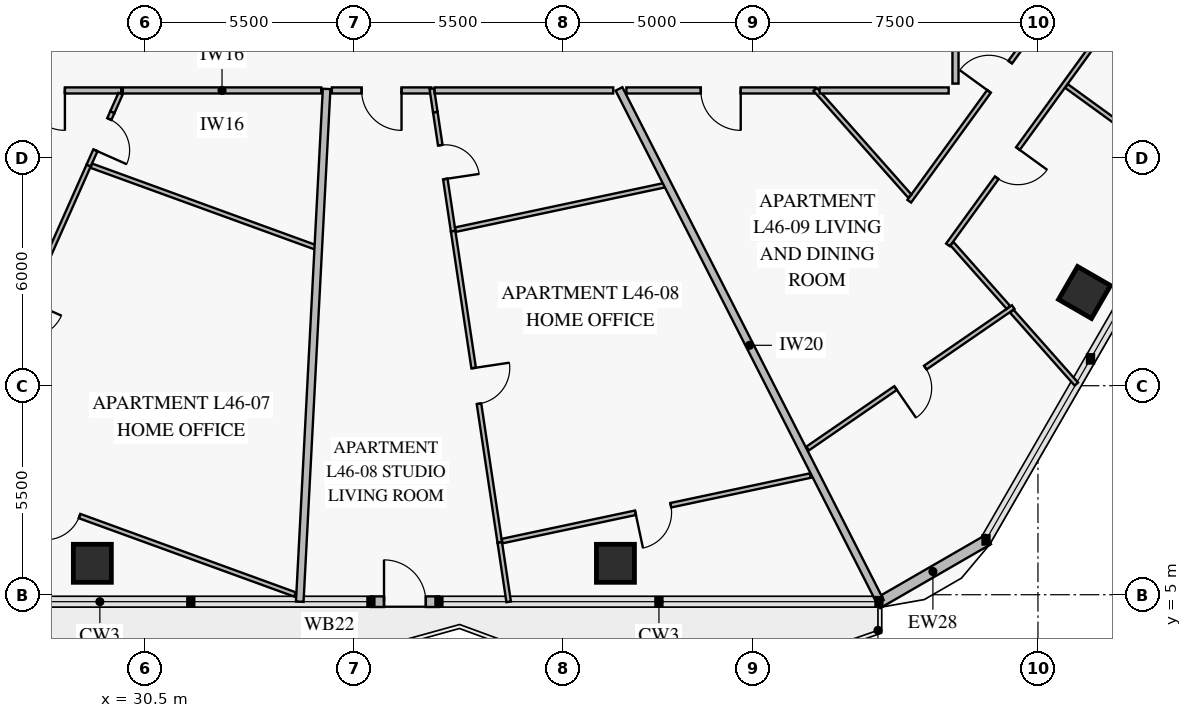
"""IFC4 building model, lengths in metres.
Left out: names, types, materials, properties, quantities, classifications, styles, units other than length and angle.
Written with IfcOpenShell. Run it as: python <this file> out.ifc"""

import sys

from ifc_helpers import new_model, si_unit, direction, frame, frame_2d, origin, origin_2d, place, context, subcontext, project, spatial, rectangle, extrude, element, fill, save


model = new_model("IFC4")
c1 = context("Model", 3, precision=1e-05, world=origin(), true_north=direction((0.0, 1.0)))
c2 = subcontext(c1, "Body", "Model", "MODEL_VIEW")
j1 = project(units=[si_unit("LENGTHUNIT", "METRE"), si_unit("PLANEANGLEUNIT", "RADIAN")], contexts=[c1])
p1 = place(None, origin())
s1 = spatial("IfcSite", under=j1, at=p1, CompositionType="ELEMENT")
p2 = place(p1, origin())
s2 = spatial("IfcBuilding", under=s1, at=p2, CompositionType="ELEMENT")
p3 = place(p2, frame((0.0, 0.0, 184.6)))
s3 = spatial("IfcBuildingStorey", under=s2, at=p3, CompositionType="ELEMENT", Elevation=184.6)
for number, where, z_axis, x_axis in (
    (1, (29.118, 5.827, 0.0), (0.0, 0.0, 1.0), (1.0, 0.0, 0.0)),
    (2, (42.882, 5.827, 0.0), (0.0, 0.0, 1.0), (1.0, 0.0, 0.0)),
    (3, (55.226, 12.953, 0.0), (0.0, 0.0, 1.0), (0.5, 0.866, 0.0)),
):
    element("IfcColumn", number, at=place(p3, frame(where, z_axis=z_axis, x_axis=x_axis)), inside=s3, PredefinedType="COLUMN", context=c2, shape_type="SweptSolid", body=[
        extrude(rectangle(XDim=1.0, YDim=1.0, at=origin_2d()), origin(), (0.0, 0.0, 1.0), 3.55),
    ])
p4 = place(p3, frame((52.693, 6.452, 0.0), z_axis=(0.0, 0.0, 1.0), x_axis=(-0.866020068361, -0.500009241111, 0.0)))
e4 = element("IfcWall", 4, at=p4, inside=s3, PredefinedType="SOLIDWALL", context=c2, shape_type="SweptSolid", body=[
    extrude(rectangle(XDim=3.365, YDim=0.28, at=frame_2d((1.683, 0.0))), origin(), (0.0, 0.0, 1.0), 3.55),
])
p5 = place(p3, frame((38.238, 4.817, 0.0), z_axis=(0.0, 0.0, 1.0), x_axis=(-1.0, 0.0, 0.0)))
e5 = element("IfcWall", 5, at=p5, inside=s3, PredefinedType="SOLIDWALL", context=c2, shape_type="SweptSolid", body=[
    extrude(rectangle(XDim=1.79, YDim=0.28, at=frame_2d((0.895, 0.0))), origin(), (0.0, 0.0, 1.0), 3.55),
])
p6 = place(p5, frame((0.345, 0.0, 0.0)))
e6 = element("IfcOpeningElement", 6, at=p6, cuts=e5, PredefinedType="OPENING", context=c2, shape_type="SweptSolid", body=[
    extrude(rectangle(XDim=1.1, YDim=2.2, at=frame_2d((0.55, 1.1))), frame((0.0, 0.152, 0.0), z_axis=(0.0, -1.0, 0.0), x_axis=(1.0, 0.0, 0.0)), (0.0, 0.0, 1.0), 0.304),
])
p7 = place(p3, frame((29.645, 17.7, 0.0), z_axis=(0.0, 0.0, 1.0), x_axis=(-0.406138466053, -0.91381154862, 0.0)))
e7 = element("IfcWall", 7, at=p7, inside=s3, PredefinedType="PARTITIONING", context=c2, shape_type="SweptSolid", body=[
    extrude(rectangle(XDim=1.544, YDim=0.12, at=frame_2d((0.772, 0.0))), origin(), (0.0, 0.0, 1.0), 3.55),
])
p8 = place(p7, frame((0.2, 0.0, 0.0)))
e8 = element("IfcOpeningElement", 8, at=p8, cuts=e7, PredefinedType="OPENING", context=c2, shape_type="SweptSolid", body=[
    extrude(rectangle(XDim=0.9, YDim=2.1, at=frame_2d((0.45, 1.05))), frame((0.0, 0.072, 0.0), z_axis=(0.0, -1.0, 0.0), x_axis=(1.0, 0.0, 0.0)), (0.0, 0.0, 1.0), 0.144),
])
p9 = place(p3, frame((29.018, 16.289, 0.0), z_axis=(0.0, 0.0, 1.0), x_axis=(-0.406112696121, -0.913823001489, 0.0)))
e9 = element("IfcWall", 9, at=p9, inside=s3, PredefinedType="PARTITIONING", context=c2, shape_type="SweptSolid", body=[
    extrude(rectangle(XDim=8.79, YDim=0.12, at=frame_2d((4.395, 0.0))), origin(), (0.0, 0.0, 1.0), 3.55),
])
p10 = place(p9, frame((3.895, 0.0, 0.0)))
e10 = element("IfcOpeningElement", 10, at=p10, cuts=e9, PredefinedType="OPENING", context=c2, shape_type="SweptSolid", body=[
    extrude(rectangle(XDim=0.95, YDim=2.1, at=frame_2d((0.475, 1.05))), frame((0.0, 0.072, 0.0), z_axis=(0.0, -1.0, 0.0), x_axis=(1.0, 0.0, 0.0)), (0.0, 0.0, 1.0), 0.144),
])
p11 = place(p3, frame((25.523, 8.256, 0.0), z_axis=(0.0, 0.0, 1.0), x_axis=(0.939699589425, -0.34200099654, 0.0)))
e11 = element("IfcWall", 11, at=p11, inside=s3, PredefinedType="PARTITIONING", context=c2, shape_type="SweptSolid", body=[
    extrude(rectangle(XDim=9.499, YDim=0.12, at=frame_2d((4.75, 0.0))), origin(), (0.0, 0.0, 1.0), 2.87),
])
p12 = place(p11, frame((2.517, 0.0, 0.0)))
e12 = element("IfcOpeningElement", 12, at=p12, cuts=e11, PredefinedType="OPENING", context=c2, shape_type="SweptSolid", body=[
    extrude(rectangle(XDim=0.95, YDim=2.1, at=frame_2d((0.475, 1.05))), frame((0.0, 0.072, 0.0), z_axis=(0.0, -1.0, 0.0), x_axis=(1.0, 0.0, 0.0)), (0.0, 0.0, 1.0), 0.144),
])
p13 = place(p3, frame((25.865, 18.27, 0.0), z_axis=(0.0, 0.0, 1.0), x_axis=(1.0, 0.0, 0.0)))
e13 = element("IfcWall", 13, at=p13, inside=s3, PredefinedType="PARTITIONING", context=c2, shape_type="SweptSolid", body=[
    extrude(rectangle(XDim=4.011, YDim=0.16, at=frame_2d((2.006, 0.0))), origin(), (0.0, 0.0, 1.0), 3.55),
])
p14 = place(p13, frame((1.481, 0.0, 0.0)))
e14 = element("IfcOpeningElement", 14, at=p14, cuts=e13, PredefinedType="OPENING", context=c2, shape_type="SweptSolid", body=[
    extrude(rectangle(XDim=1.05, YDim=2.15, at=frame_2d((0.525, 1.075))), frame((0.0, 0.092, 0.0), z_axis=(0.0, -1.0, 0.0), x_axis=(1.0, 0.0, 0.0)), (0.0, 0.0, 1.0), 0.184),
])
p15 = place(p3, frame((38.142, 17.7, 0.0), z_axis=(0.0, 0.0, 1.0), x_axis=(0.148099173733, -0.988972514653, 0.0)))
e15 = element("IfcWall", 15, at=p15, inside=s3, PredefinedType="PARTITIONING", context=c2, shape_type="SweptSolid", body=[
    extrude(rectangle(XDim=3.167, YDim=0.12, at=frame_2d((1.583, 0.0))), origin(), (0.0, 0.0, 1.0), 3.55),
])
p16 = place(p15, frame((0.88, 0.0, 0.0)))
e16 = element("IfcOpeningElement", 16, at=p16, cuts=e15, PredefinedType="OPENING", context=c2, shape_type="SweptSolid", body=[
    extrude(rectangle(XDim=0.9, YDim=2.1, at=frame_2d((0.45, 1.05))), frame((0.0, 0.072, 0.0), z_axis=(0.0, -1.0, 0.0), x_axis=(1.0, 0.0, 0.0)), (0.0, 0.0, 1.0), 0.144),
])
p17 = place(p3, frame((38.611, 14.568, 0.0), z_axis=(0.0, 0.0, 1.0), x_axis=(0.148161808742, -0.988963132999, 0.0)))
e17 = element("IfcWall", 17, at=p17, inside=s3, PredefinedType="PARTITIONING", context=c2, shape_type="SweptSolid", body=[
    extrude(rectangle(XDim=8.287, YDim=0.12, at=frame_2d((4.144, 0.0))), origin(), (0.0, 0.0, 1.0), 3.15),
])
p18 = place(p17, frame((3.643, 0.0, 0.0)))
e18 = element("IfcOpeningElement", 18, at=p18, cuts=e17, PredefinedType="OPENING", context=c2, shape_type="SweptSolid", body=[
    extrude(rectangle(XDim=0.95, YDim=2.1, at=frame_2d((0.475, 1.05))), frame((0.0, 0.072, 0.0), z_axis=(0.0, -1.0, 0.0), x_axis=(1.0, 0.0, 0.0)), (0.0, 0.0, 1.0), 0.144),
])
p19 = place(p3, frame((39.902, 6.412, 0.0), z_axis=(0.0, 0.0, 1.0), x_axis=(0.978148894312, 0.207905604918, 0.0)))
e19 = element("IfcWall", 19, at=p19, inside=s3, PredefinedType="PARTITIONING", context=c2, shape_type="SweptSolid", body=[
    extrude(rectangle(XDim=8.289, YDim=0.12, at=frame_2d((4.145, 0.0))), origin(), (0.0, 0.0, 1.0), 2.87),
])
p20 = place(p19, frame((3.586, 0.0, 0.0)))
e20 = element("IfcOpeningElement", 20, at=p20, cuts=e19, PredefinedType="OPENING", context=c2, shape_type="SweptSolid", body=[
    extrude(rectangle(XDim=0.95, YDim=2.1, at=frame_2d((0.475, 1.05))), frame((0.0, 0.072, 0.0), z_axis=(0.0, -1.0, 0.0), x_axis=(1.0, 0.0, 0.0)), (0.0, 0.0, 1.0), 0.144),
])
p21 = place(p3, frame((35.421, 18.27, 0.0), z_axis=(0.0, 0.0, 1.0), x_axis=(1.0, 0.0, 0.0)))
e21 = element("IfcWall", 21, at=p21, inside=s3, PredefinedType="PARTITIONING", context=c2, shape_type="SweptSolid", body=[
    extrude(rectangle(XDim=2.616, YDim=0.16, at=frame_2d((1.308, 0.0))), origin(), (0.0, 0.0, 1.0), 3.55),
])
p22 = place(p21, frame((0.783, 0.0, 0.0)))
e22 = element("IfcOpeningElement", 22, at=p22, cuts=e21, PredefinedType="OPENING", context=c2, shape_type="SweptSolid", body=[
    extrude(rectangle(XDim=1.05, YDim=2.15, at=frame_2d((0.525, 1.075))), frame((0.0, 0.092, 0.0), z_axis=(0.0, -1.0, 0.0), x_axis=(1.0, 0.0, 0.0)), (0.0, 0.0, 1.0), 0.184),
])
p23 = place(p3, frame((47.94, 8.847, 0.0), z_axis=(0.0, 0.0, 1.0), x_axis=(0.823925822712, 0.566697660723, 0.0)))
e23 = element("IfcWall", 23, at=p23, inside=s3, PredefinedType="PARTITIONING", context=c2, shape_type="SweptSolid", body=[
    extrude(rectangle(XDim=6.566, YDim=0.12, at=frame_2d((3.283, 0.0))), origin(), (0.0, 0.0, 1.0), 2.87),
])
p24 = place(p23, frame((2.808, 0.0, 0.0)))
e24 = element("IfcOpeningElement", 24, at=p24, cuts=e23, PredefinedType="OPENING", context=c2, shape_type="SweptSolid", body=[
    extrude(rectangle(XDim=0.95, YDim=2.1, at=frame_2d((0.475, 1.05))), frame((0.0, 0.072, 0.0), z_axis=(0.0, -1.0, 0.0), x_axis=(1.0, 0.0, 0.0)), (0.0, 0.0, 1.0), 0.144),
])
p25 = place(p3, frame((50.613, 15.355, 0.0), z_axis=(0.0, 0.0, 1.0), x_axis=(0.587519111836, 0.809210289867, 0.0)))
e25 = element("IfcWall", 25, at=p25, inside=s3, PredefinedType="PARTITIONING", context=c2, shape_type="SweptSolid", body=[
    extrude(rectangle(XDim=9.768, YDim=0.12, at=frame_2d((4.884, 0.0))), origin(), (0.0, 0.0, 1.0), 2.9),
])
p26 = place(p25, frame((3.572, 0.0, 0.0)))
e26 = element("IfcOpeningElement", 26, at=p26, cuts=e25, PredefinedType="OPENING", context=c2, shape_type="SweptSolid", body=[
    extrude(rectangle(XDim=0.95, YDim=2.1, at=frame_2d((0.475, 1.05))), frame((0.0, 0.072, 0.0), z_axis=(0.0, -1.0, 0.0), x_axis=(1.0, 0.0, 0.0)), (0.0, 0.0, 1.0), 0.144),
])
p27 = place(p25, frame((7.719, 0.0, 0.0)))
e27 = element("IfcOpeningElement", 27, at=p27, cuts=e25, PredefinedType="OPENING", context=c2, shape_type="SweptSolid", body=[
    extrude(rectangle(XDim=0.9, YDim=2.1, at=frame_2d((0.45, 1.05))), frame((0.0, 0.072, 0.0), z_axis=(0.0, -1.0, 0.0), x_axis=(1.0, 0.0, 0.0)), (0.0, 0.0, 1.0), 0.144),
])
p28 = place(p3, frame((51.632, 14.205, 0.0), z_axis=(0.0, 0.0, 1.0), x_axis=(0.587503568884, 0.809221574446, 0.0)))
e28 = element("IfcWall", 28, at=p28, inside=s3, PredefinedType="PARTITIONING", context=c2, shape_type="SweptSolid", body=[
    extrude(rectangle(XDim=10.432, YDim=0.12, at=frame_2d((5.216, 0.0))), origin(), (0.0, 0.0, 1.0), 2.9),
])
p29 = place(p28, frame((2.183, 0.0, 0.0)))
e29 = element("IfcOpeningElement", 29, at=p29, cuts=e28, PredefinedType="OPENING", context=c2, shape_type="SweptSolid", body=[
    extrude(rectangle(XDim=0.95, YDim=2.1, at=frame_2d((0.475, 1.05))), frame((0.0, 0.072, 0.0), z_axis=(0.0, -1.0, 0.0), x_axis=(1.0, 0.0, 0.0)), (0.0, 0.0, 1.0), 0.144),
])
p30 = place(p28, frame((7.299, 0.0, 0.0)))
e30 = element("IfcOpeningElement", 30, at=p30, cuts=e28, PredefinedType="OPENING", context=c2, shape_type="SweptSolid", body=[
    extrude(rectangle(XDim=0.95, YDim=2.1, at=frame_2d((0.475, 1.05))), frame((0.0, 0.072, 0.0), z_axis=(0.0, -1.0, 0.0), x_axis=(1.0, 0.0, 0.0)), (0.0, 0.0, 1.0), 0.144),
])
p31 = place(p3, frame((43.17, 18.27, 0.0), z_axis=(0.0, 0.0, 1.0), x_axis=(1.0, 0.0, 0.0)))
e31 = element("IfcWall", 31, at=p31, inside=s3, PredefinedType="PARTITIONING", context=c2, shape_type="SweptSolid", body=[
    extrude(rectangle(XDim=4.968, YDim=0.16, at=frame_2d((2.484, 0.0))), origin(), (0.0, 0.0, 1.0), 3.55),
])
p32 = place(p31, frame((1.959, 0.0, 0.0)))
e32 = element("IfcOpeningElement", 32, at=p32, cuts=e31, PredefinedType="OPENING", context=c2, shape_type="SweptSolid", body=[
    extrude(rectangle(XDim=1.05, YDim=2.15, at=frame_2d((0.525, 1.075))), frame((0.0, 0.092, 0.0), z_axis=(0.0, -1.0, 0.0), x_axis=(1.0, 0.0, 0.0)), (0.0, 0.0, 1.0), 0.184),
])
p33 = place(p3, frame((29.859, 18.182, 0.0), z_axis=(0.0, 0.0, 1.0), x_axis=(-0.406009598867, -0.913868812045, 0.0)))
e33 = element("IfcWall", 33, at=p33, inside=s3, PredefinedType="PARTITIONING", context=c2, shape_type="SweptSolid", body=[
    extrude(rectangle(XDim=0.527, YDim=0.12, at=frame_2d((0.264, 0.0))), origin(), (0.0, 0.0, 1.0), 3.55),
])
p34 = place(p3, frame((29.093, 16.289, 0.0), z_axis=(0.0, 0.0, 1.0), x_axis=(0.939683531228, -0.342045115647, 0.0)))
e34 = element("IfcWall", 34, at=p34, inside=s3, PredefinedType="PARTITIONING", context=c2, shape_type="SweptSolid", body=[
    extrude(rectangle(XDim=6.295, YDim=0.12, at=frame_2d((3.147, 0.0))), origin(), (0.0, 0.0, 1.0), 2.9),
])
p35 = place(p3, frame((35.282, 18.31, 0.0), z_axis=(0.0, 0.0, 1.0), x_axis=(-0.052327430458, -0.998629981536, 0.0)))
e35 = element("IfcWall", 35, at=p35, inside=s3, PredefinedType="PARTITIONING", context=c2, shape_type="SweptSolid", body=[
    extrude(rectangle(XDim=13.512, YDim=0.2, at=frame_2d((6.756, 0.0))), origin(), (0.0, 0.0, 1.0), 2.87),
])
p36 = place(p3, frame((38.05, 18.315, 0.0), z_axis=(0.0, 0.0, 1.0), x_axis=(0.148071563401, -0.988976648922, 0.0)))
e36 = element("IfcWall", 36, at=p36, inside=s3, PredefinedType="PARTITIONING", context=c2, shape_type="SweptSolid", body=[
    extrude(rectangle(XDim=0.622, YDim=0.12, at=frame_2d((0.311, 0.0))), origin(), (0.0, 0.0, 1.0), 3.55),
])
p37 = place(p3, frame((39.839, 6.373, 0.0), z_axis=(0.0, 0.0, 1.0), x_axis=(0.148196726009, -0.988957901227, 0.0)))
e37 = element("IfcWall", 37, at=p37, inside=s3, PredefinedType="PARTITIONING", context=c2, shape_type="SweptSolid", body=[
    extrude(rectangle(XDim=1.578, YDim=0.12, at=frame_2d((0.789, 0.0))), origin(), (0.0, 0.0, 1.0), 2.87),
])
p38 = place(p3, frame((38.674, 14.607, 0.0), z_axis=(0.0, 0.0, 1.0), x_axis=(0.978141487947, 0.207940447142, 0.0)))
e38 = element("IfcWall", 38, at=p38, inside=s3, PredefinedType="PARTITIONING", context=c2, shape_type="SweptSolid", body=[
    extrude(rectangle(XDim=5.647, YDim=0.12, at=frame_2d((2.824, 0.0))), origin(), (0.0, 0.0, 1.0), 2.9),
])
p39 = place(p3, frame((42.975, 18.31, 0.0), z_axis=(0.0, 0.0, 1.0), x_axis=(0.453997506489, -0.891002954037, 0.0)))
e39 = element("IfcWall", 39, at=p39, inside=s3, PredefinedType="PARTITIONING", context=c2, shape_type="SweptSolid", body=[
    extrude(rectangle(XDim=15.144, YDim=0.2, at=frame_2d((7.572, 0.0))), origin(), (0.0, 0.0, 1.0), 2.87),
])
p40 = place(p3, frame((54.752, 18.386, 0.0), z_axis=(0.0, 0.0, 1.0), x_axis=(0.809234621537, -0.587485597531, 0.0)))
e40 = element("IfcWall", 40, at=p40, inside=s3, PredefinedType="PARTITIONING", context=c2, shape_type="SweptSolid", body=[
    extrude(rectangle(XDim=4.169, YDim=0.12, at=frame_2d((2.085, 0.0))), origin(), (0.0, 0.0, 1.0), 2.87),
])
p41 = place(p3, frame((48.138, 18.3, 0.0), z_axis=(0.0, 0.0, 1.0), x_axis=(0.663123743862, -0.748509786393, 0.0)))
e41 = element("IfcWall", 41, at=p41, inside=s3, PredefinedType="PARTITIONING", context=c2, shape_type="SweptSolid", body=[
    extrude(rectangle(XDim=3.754, YDim=0.12, at=frame_2d((1.877, 0.0))), origin(), (0.0, 0.0, 1.0), 3.55),
])
p42 = place(p3, frame((51.739, 14.236, 0.0), z_axis=(0.0, 0.0, 1.0), x_axis=(0.663176854864, -0.74846273065, 0.0)))
e42 = element("IfcWall", 42, at=p42, inside=s3, PredefinedType="PARTITIONING", context=c2, shape_type="SweptSolid", body=[
    extrude(rectangle(XDim=2.236, YDim=0.12, at=frame_2d((1.118, 0.0))), origin(), (0.0, 0.0, 1.0), 3.55),
])
p43 = place(p3, frame((53.312, 12.46, 0.0), z_axis=(0.0, 0.0, 1.0), x_axis=(0.663102409331, -0.748528686651, 0.0)))
e43 = element("IfcWall", 43, at=p43, inside=s3, PredefinedType="PARTITIONING", context=c2, shape_type="SweptSolid", body=[
    extrude(rectangle(XDim=2.561, YDim=0.12, at=frame_2d((1.28, 0.0))), origin(), (0.0, 0.0, 1.0), 2.87),
])
p44 = place(p3, frame((29.92, 18.27, 0.0), z_axis=(0.0, 0.0, 1.0), x_axis=(1.0, 0.0, 0.0)))
e44 = element("IfcWall", 44, at=p44, inside=s3, PredefinedType="PARTITIONING", context=c2, shape_type="SweptSolid", body=[
    extrude(rectangle(XDim=5.22, YDim=0.16, at=frame_2d((2.61, 0.0))), origin(), (0.0, 0.0, 1.0), 2.9),
])
p45 = place(p3, frame((38.126, 18.27, 0.0), z_axis=(0.0, 0.0, 1.0), x_axis=(1.0, 0.0, 0.0)))
e45 = element("IfcWall", 45, at=p45, inside=s3, PredefinedType="PARTITIONING", context=c2, shape_type="SweptSolid", body=[
    extrude(rectangle(XDim=4.698, YDim=0.16, at=frame_2d((2.349, 0.0))), origin(), (0.0, 0.0, 1.0), 2.9),
])
p46 = place(p3, frame((51.83, 18.45, 0.0), z_axis=(0.0, 0.0, 1.0), x_axis=(0.0, 1.0, 0.0)))
e46 = element("IfcWall", 46, at=p46, inside=s3, PredefinedType="PARTITIONING", context=c2, shape_type="SweptSolid", body=[
    extrude(rectangle(XDim=3.7, YDim=0.16, at=frame_2d((1.85, 0.0))), origin(), (0.0, 0.0, 1.0), 3.15),
])
p47 = place(p3, frame((48.255, 18.27, 0.0), z_axis=(0.0, 0.0, 1.0), x_axis=(1.0, 0.0, 0.0)))
e47 = element("IfcWall", 47, at=p47, inside=s3, PredefinedType="PARTITIONING", context=c2, shape_type="SweptSolid", body=[
    extrude(rectangle(XDim=3.395, YDim=0.16, at=frame_2d((1.697, 0.0))), origin(), (0.0, 0.0, 1.0), 2.9),
])
p48 = place(p6, frame((1.1, 0.0, 0.0), z_axis=(0.0, 0.0, 1.0), x_axis=(-1.0, 0.0, 0.0)))
e48 = element("IfcDoor", 48, at=p48, inside=s3, OperationType="SINGLE_SWING_LEFT", PredefinedType="DOOR", context=c2, shape_type="SweptSolid", body=[
    extrude(rectangle(XDim=1.1, YDim=2.2, at=frame_2d((0.55, 1.1))), frame((0.0, 0.025, 0.0), z_axis=(0.0, -1.0, 0.0), x_axis=(1.0, 0.0, 0.0)), (0.0, 0.0, 1.0), 0.05),
])
fill(e6, e48)
p49 = place(p8, origin())
e49 = element("IfcDoor", 49, at=p49, inside=s3, OperationType="SINGLE_SWING_RIGHT", PredefinedType="DOOR", context=c2, shape_type="SweptSolid", body=[
    extrude(rectangle(XDim=0.9, YDim=2.1, at=frame_2d((0.45, 1.05))), frame((0.0, 0.025, 0.0), z_axis=(0.0, -1.0, 0.0), x_axis=(1.0, 0.0, 0.0)), (0.0, 0.0, 1.0), 0.05),
])
fill(e8, e49)
p50 = place(p12, frame((0.95, 0.0, 0.0), z_axis=(0.0, 0.0, 1.0), x_axis=(-1.0, 0.0, 0.0)))
e50 = element("IfcDoor", 50, at=p50, inside=s3, OperationType="SINGLE_SWING_RIGHT", PredefinedType="DOOR", context=c2, shape_type="SweptSolid", body=[
    extrude(rectangle(XDim=0.95, YDim=2.1, at=frame_2d((0.475, 1.05))), frame((0.0, 0.025, 0.0), z_axis=(0.0, -1.0, 0.0), x_axis=(1.0, 0.0, 0.0)), (0.0, 0.0, 1.0), 0.05),
])
fill(e12, e50)
p51 = place(p14, frame((1.05, 0.0, 0.0), z_axis=(0.0, 0.0, 1.0), x_axis=(-1.0, 0.0, 0.0)))
e51 = element("IfcDoor", 51, at=p51, inside=s3, OperationType="SINGLE_SWING_LEFT", PredefinedType="DOOR", context=c2, shape_type="SweptSolid", body=[
    extrude(rectangle(XDim=1.05, YDim=2.15, at=frame_2d((0.525, 1.075))), frame((0.0, 0.025, 0.0), z_axis=(0.0, -1.0, 0.0), x_axis=(1.0, 0.0, 0.0)), (0.0, 0.0, 1.0), 0.05),
])
fill(e14, e51)
p52 = place(p16, origin())
e52 = element("IfcDoor", 52, at=p52, inside=s3, OperationType="SINGLE_SWING_RIGHT", PredefinedType="DOOR", context=c2, shape_type="SweptSolid", body=[
    extrude(rectangle(XDim=0.9, YDim=2.1, at=frame_2d((0.45, 1.05))), frame((0.0, 0.025, 0.0), z_axis=(0.0, -1.0, 0.0), x_axis=(1.0, 0.0, 0.0)), (0.0, 0.0, 1.0), 0.05),
])
fill(e16, e52)
p53 = place(p18, origin())
e53 = element("IfcDoor", 53, at=p53, inside=s3, OperationType="SINGLE_SWING_LEFT", PredefinedType="DOOR", context=c2, shape_type="SweptSolid", body=[
    extrude(rectangle(XDim=0.95, YDim=2.1, at=frame_2d((0.475, 1.05))), frame((0.0, 0.025, 0.0), z_axis=(0.0, -1.0, 0.0), x_axis=(1.0, 0.0, 0.0)), (0.0, 0.0, 1.0), 0.05),
])
fill(e18, e53)
p54 = place(p20, frame((0.95, 0.0, 0.0), z_axis=(0.0, 0.0, 1.0), x_axis=(-1.0, 0.0, 0.0)))
e54 = element("IfcDoor", 54, at=p54, inside=s3, OperationType="SINGLE_SWING_RIGHT", PredefinedType="DOOR", context=c2, shape_type="SweptSolid", body=[
    extrude(rectangle(XDim=0.95, YDim=2.1, at=frame_2d((0.475, 1.05))), frame((0.0, 0.025, 0.0), z_axis=(0.0, -1.0, 0.0), x_axis=(1.0, 0.0, 0.0)), (0.0, 0.0, 1.0), 0.05),
])
fill(e20, e54)
p55 = place(p22, frame((1.05, 0.0, 0.0), z_axis=(0.0, 0.0, 1.0), x_axis=(-1.0, 0.0, 0.0)))
e55 = element("IfcDoor", 55, at=p55, inside=s3, OperationType="SINGLE_SWING_LEFT", PredefinedType="DOOR", context=c2, shape_type="SweptSolid", body=[
    extrude(rectangle(XDim=1.05, YDim=2.15, at=frame_2d((0.525, 1.075))), frame((0.0, 0.025, 0.0), z_axis=(0.0, -1.0, 0.0), x_axis=(1.0, 0.0, 0.0)), (0.0, 0.0, 1.0), 0.05),
])
fill(e22, e55)
p56 = place(p24, frame((0.95, 0.0, 0.0), z_axis=(0.0, 0.0, 1.0), x_axis=(-1.0, 0.0, 0.0)))
e56 = element("IfcDoor", 56, at=p56, inside=s3, OperationType="SINGLE_SWING_RIGHT", PredefinedType="DOOR", context=c2, shape_type="SweptSolid", body=[
    extrude(rectangle(XDim=0.95, YDim=2.1, at=frame_2d((0.475, 1.05))), frame((0.0, 0.025, 0.0), z_axis=(0.0, -1.0, 0.0), x_axis=(1.0, 0.0, 0.0)), (0.0, 0.0, 1.0), 0.05),
])
fill(e24, e56)
p57 = place(p26, origin())
e57 = element("IfcDoor", 57, at=p57, inside=s3, OperationType="SINGLE_SWING_LEFT", PredefinedType="DOOR", context=c2, shape_type="SweptSolid", body=[
    extrude(rectangle(XDim=0.95, YDim=2.1, at=frame_2d((0.475, 1.05))), frame((0.0, 0.025, 0.0), z_axis=(0.0, -1.0, 0.0), x_axis=(1.0, 0.0, 0.0)), (0.0, 0.0, 1.0), 0.05),
])
fill(e26, e57)
p58 = place(p29, frame((0.95, 0.0, 0.0), z_axis=(0.0, 0.0, 1.0), x_axis=(-1.0, 0.0, 0.0)))
e58 = element("IfcDoor", 58, at=p58, inside=s3, OperationType="SINGLE_SWING_LEFT", PredefinedType="DOOR", context=c2, shape_type="SweptSolid", body=[
    extrude(rectangle(XDim=0.95, YDim=2.1, at=frame_2d((0.475, 1.05))), frame((0.0, 0.025, 0.0), z_axis=(0.0, -1.0, 0.0), x_axis=(1.0, 0.0, 0.0)), (0.0, 0.0, 1.0), 0.05),
])
fill(e29, e58)
p59 = place(p32, frame((1.05, 0.0, 0.0), z_axis=(0.0, 0.0, 1.0), x_axis=(-1.0, 0.0, 0.0)))
e59 = element("IfcDoor", 59, at=p59, inside=s3, OperationType="SINGLE_SWING_LEFT", PredefinedType="DOOR", context=c2, shape_type="SweptSolid", body=[
    extrude(rectangle(XDim=1.05, YDim=2.15, at=frame_2d((0.525, 1.075))), frame((0.0, 0.025, 0.0), z_axis=(0.0, -1.0, 0.0), x_axis=(1.0, 0.0, 0.0)), (0.0, 0.0, 1.0), 0.05),
])
fill(e32, e59)
save(model, sys.argv[1])
